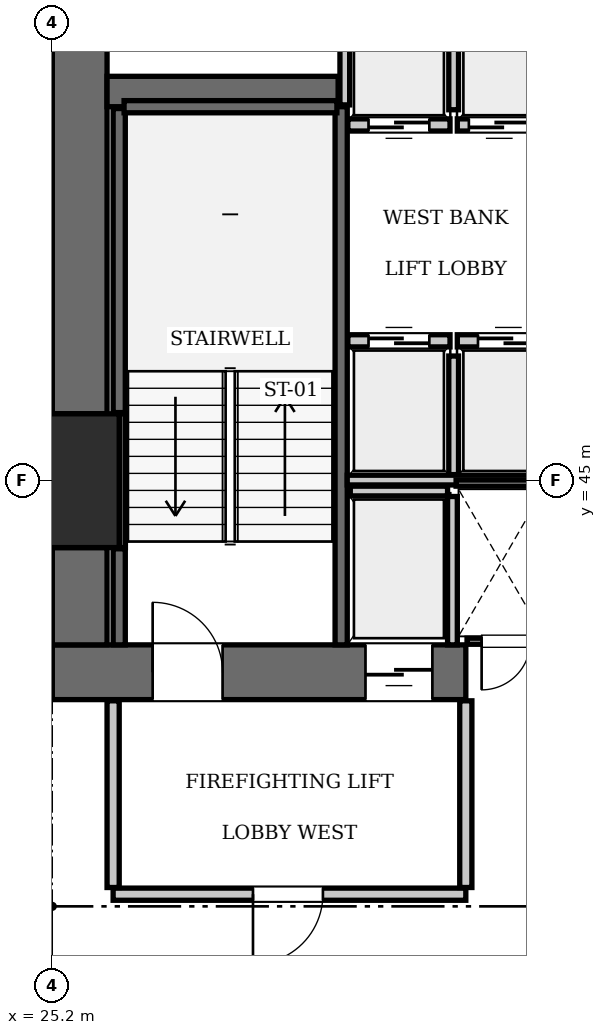
"""IFC4 building model, lengths in metres.
Left out: names, types, materials, properties, quantities, classifications, styles, units other than length and angle.
Written with IfcOpenShell. Run it as: python <this file> out.ifc"""

import sys

from ifc_helpers import new_model, si_unit, direction, frame, frame_2d, origin, origin_2d, place, context, subcontext, project, spatial, rectangle, extrude, element, fill, save


model = new_model("IFC4")
c1 = context("Model", 3, precision=1e-05, world=origin(), true_north=direction((0.0, 1.0)))
c2 = subcontext(c1, "Body", "Model", "MODEL_VIEW")
j1 = project(units=[si_unit("LENGTHUNIT", "METRE"), si_unit("PLANEANGLEUNIT", "RADIAN")], contexts=[c1])
p1 = place(None, origin())
s1 = spatial("IfcSite", under=j1, at=p1, CompositionType="ELEMENT")
p2 = place(p1, origin())
s2 = spatial("IfcBuilding", under=s1, at=p2, CompositionType="ELEMENT")
p3 = place(p2, frame((0.0, 0.0, 84.7)))
s3 = spatial("IfcBuildingStorey", under=s2, at=p3, CompositionType="ELEMENT", Elevation=84.7)
p4 = place(p3, frame((25.2, 45.0, 0.0), z_axis=(0.0, 0.0, 1.0), x_axis=(1.0, 0.0, 0.0)))
e1 = element("IfcColumn", 1, at=p4, inside=s3, PredefinedType="COLUMN", context=c2, shape_type="SweptSolid", body=[
    extrude(rectangle(XDim=2.2, YDim=2.2, at=origin_2d()), origin(), (0.0, 0.0, 1.0), 3.85),
])
p5 = place(p3, frame((25.2, 41.85, 0.0), z_axis=(0.0, 0.0, 1.0), x_axis=(1.0, 0.0, 0.0)))
e2 = element("IfcWall", 2, at=p5, inside=s3, PredefinedType="SHEAR", context=c2, shape_type="SweptSolid", body=[
    extrude(rectangle(XDim=6.8, YDim=0.9, at=frame_2d((3.4, 0.0))), origin(), (0.0, 0.0, 1.0), 3.85),
])
p6 = place(p5, frame((1.65, 0.0, 0.0)))
e3 = element("IfcOpeningElement", 3, at=p6, cuts=e2, PredefinedType="OPENING", context=c2, shape_type="SweptSolid", body=[
    extrude(rectangle(XDim=1.15, YDim=2.15, at=frame_2d((0.575, 1.075))), frame((0.0, 0.46, 0.0), z_axis=(0.0, -1.0, 0.0), x_axis=(1.0, 0.0, 0.0)), (0.0, 0.0, 1.0), 0.92),
])
p7 = place(p5, frame((5.15, 0.0, 0.0)))
e4 = element("IfcOpeningElement", 4, at=p7, cuts=e2, PredefinedType="OPENING", context=c2, shape_type="SweptSolid", body=[
    extrude(rectangle(XDim=1.1, YDim=2.2, at=frame_2d((0.55, 1.1))), frame((0.0, 0.46, 0.0), z_axis=(0.0, -1.0, 0.0), x_axis=(1.0, 0.0, 0.0)), (0.0, 0.0, 1.0), 0.92),
])
p8 = place(p3, frame((25.65, 42.3, 0.0), z_axis=(0.0, 0.0, 1.0), x_axis=(0.0, 1.0, 0.0)))
e5 = element("IfcWall", 5, at=p8, inside=s3, PredefinedType="SHEAR", context=c2, shape_type="SweptSolid", body=[
    extrude(rectangle(XDim=1.6, YDim=0.9, at=frame_2d((0.8, 0.0))), origin(), (0.0, 0.0, 1.0), 3.85),
])
p9 = place(p3, frame((25.65, 46.1, 0.0), z_axis=(0.0, 0.0, 1.0), x_axis=(0.0, 1.0, 0.0)))
e6 = element("IfcWall", 6, at=p9, inside=s3, PredefinedType="SHEAR", context=c2, shape_type="SweptSolid", body=[
    extrude(rectangle(XDim=7.0, YDim=0.9, at=frame_2d((3.5, 0.0))), origin(), (0.0, 0.0, 1.0), 3.85),
])
p10 = place(p3, frame((26.1, 51.4, 0.0), z_axis=(0.0, 0.0, 1.0), x_axis=(1.0, 0.0, 0.0)))
e7 = element("IfcWall", 7, at=p10, inside=s3, PredefinedType="SHEAR", context=c2, shape_type="SweptSolid", body=[
    extrude(rectangle(XDim=3.8, YDim=0.5, at=frame_2d((1.9, 0.0))), origin(), (0.0, 0.0, 1.0), 3.85),
])
p11 = place(p3, frame((29.95, 42.3, 0.0), z_axis=(0.0, 0.0, 1.0), x_axis=(0.0, 1.0, 0.0)))
e8 = element("IfcWall", 8, at=p11, inside=s3, PredefinedType="SOLIDWALL", context=c2, shape_type="SweptSolid", body=[
    extrude(rectangle(XDim=8.85, YDim=0.2, at=frame_2d((4.425, 0.0))), origin(), (0.0, 0.0, 1.0), 3.61),
])
p12 = place(p3, frame((26.3, 42.3, 0.0), z_axis=(0.0, 0.0, 1.0), x_axis=(0.0, 1.0, 0.0)))
e9 = element("IfcWall", 9, at=p12, inside=s3, PredefinedType="SOLIDWALL", context=c2, shape_type="SweptSolid", body=[
    extrude(rectangle(XDim=1.58, YDim=0.2, at=frame_2d((0.79, 0.0))), origin(), (0.0, 0.0, 1.0), 3.61),
])
p13 = place(p3, frame((26.3, 46.12, 0.0), z_axis=(0.0, 0.0, 1.0), x_axis=(0.0, 1.0, 0.0)))
e10 = element("IfcWall", 10, at=p13, inside=s3, PredefinedType="SOLIDWALL", context=c2, shape_type="SweptSolid", body=[
    extrude(rectangle(XDim=5.0, YDim=0.2, at=frame_2d((2.5, 0.0))), origin(), (0.0, 0.0, 1.0), 3.61),
])
p14 = place(p3, frame((26.38, 51.15, 0.0), z_axis=(0.0, 0.0, 1.0), x_axis=(1.0, 0.0, 0.0)))
e11 = element("IfcWall", 11, at=p14, inside=s3, PredefinedType="SOLIDWALL", context=c2, shape_type="SweptSolid", body=[
    extrude(rectangle(XDim=3.5, YDim=0.2, at=frame_2d((1.75, 0.0))), origin(), (0.0, 0.0, 1.0), 3.61),
])
p15 = place(p3, frame((26.352, 43.9, 0.0), z_axis=(0.0, 0.0, 1.0), x_axis=(0.0, 1.0, 0.0)))
e12 = element("IfcWall", 12, at=p15, inside=s3, PredefinedType="SOLIDWALL", context=c2, shape_type="SweptSolid", body=[
    extrude(rectangle(XDim=2.2, YDim=0.1, at=frame_2d((1.1, 0.0))), origin(), (0.0, 0.0, 1.0), 3.61),
])
p16 = place(p3, frame((30.06, 47.3, 0.0), z_axis=(0.0, 0.0, 1.0), x_axis=(1.0, 0.0, 0.0)))
e13 = element("IfcWall", 13, at=p16, inside=s3, PredefinedType="SOLIDWALL", context=c2, shape_type="SweptSolid", body=[
    extrude(rectangle(XDim=1.68, YDim=0.2, at=frame_2d((0.84, 0.0))), origin(), (0.0, 0.0, 1.0), 3.61),
])
p17 = place(p16, frame((0.34, 0.0, 0.0)))
e14 = element("IfcOpeningElement", 14, at=p17, cuts=e13, PredefinedType="OPENING", context=c2, shape_type="SweptSolid", body=[
    extrude(rectangle(XDim=1.0, YDim=2.15, at=frame_2d((0.5, 1.075))), frame((0.0, 0.11, 0.0), z_axis=(0.0, -1.0, 0.0), x_axis=(1.0, 0.0, 0.0)), (0.0, 0.0, 1.0), 0.22),
])
p18 = place(p3, frame((31.86, 47.3, 0.0), z_axis=(0.0, 0.0, 1.0), x_axis=(1.0, 0.0, 0.0)))
e15 = element("IfcWall", 15, at=p18, inside=s3, PredefinedType="SOLIDWALL", context=c2, shape_type="SweptSolid", body=[
    extrude(rectangle(XDim=1.68, YDim=0.2, at=frame_2d((0.84, 0.0))), origin(), (0.0, 0.0, 1.0), 3.61),
])
p19 = place(p18, frame((0.34, 0.0, 0.0)))
e16 = element("IfcOpeningElement", 16, at=p19, cuts=e15, PredefinedType="OPENING", context=c2, shape_type="SweptSolid", body=[
    extrude(rectangle(XDim=1.0, YDim=2.15, at=frame_2d((0.5, 1.075))), frame((0.0, 0.11, 0.0), z_axis=(0.0, -1.0, 0.0), x_axis=(1.0, 0.0, 0.0)), (0.0, 0.0, 1.0), 0.22),
])
p20 = place(p3, frame((30.06, 50.85, 0.0), z_axis=(0.0, 0.0, 1.0), x_axis=(1.0, 0.0, 0.0)))
e17 = element("IfcWall", 17, at=p20, inside=s3, PredefinedType="SOLIDWALL", context=c2, shape_type="SweptSolid", body=[
    extrude(rectangle(XDim=1.68, YDim=0.2, at=frame_2d((0.84, 0.0))), origin(), (0.0, 0.0, 1.0), 3.61),
])
p21 = place(p20, frame((0.34, 0.0, 0.0)))
e18 = element("IfcOpeningElement", 18, at=p21, cuts=e17, PredefinedType="OPENING", context=c2, shape_type="SweptSolid", body=[
    extrude(rectangle(XDim=1.0, YDim=2.15, at=frame_2d((0.5, 1.075))), frame((0.0, 0.11, 0.0), z_axis=(0.0, -1.0, 0.0), x_axis=(1.0, 0.0, 0.0)), (0.0, 0.0, 1.0), 0.22),
])
p22 = place(p3, frame((31.86, 50.85, 0.0), z_axis=(0.0, 0.0, 1.0), x_axis=(1.0, 0.0, 0.0)))
e19 = element("IfcWall", 19, at=p22, inside=s3, PredefinedType="SOLIDWALL", context=c2, shape_type="SweptSolid", body=[
    extrude(rectangle(XDim=1.38, YDim=0.2, at=frame_2d((0.69, 0.0))), origin(), (0.0, 0.0, 1.0), 3.61),
])
p23 = place(p22, frame((0.19, 0.0, 0.0)))
e20 = element("IfcOpeningElement", 20, at=p23, cuts=e19, PredefinedType="OPENING", context=c2, shape_type="SweptSolid", body=[
    extrude(rectangle(XDim=1.0, YDim=2.15, at=frame_2d((0.5, 1.075))), frame((0.0, 0.11, 0.0), z_axis=(0.0, -1.0, 0.0), x_axis=(1.0, 0.0, 0.0)), (0.0, 0.0, 1.0), 0.22),
])
p24 = place(p3, frame((30.1, 44.83, 0.0), z_axis=(0.0, 0.0, 1.0), x_axis=(1.0, 0.0, 0.0)))
e21 = element("IfcWall", 21, at=p24, inside=s3, PredefinedType="SOLIDWALL", context=c2, shape_type="SweptSolid", body=[
    extrude(rectangle(XDim=1.6, YDim=0.16, at=frame_2d((0.8, 0.0))), origin(), (0.0, 0.0, 1.0), 3.61),
])
p25 = place(p3, frame((31.78, 42.3, 0.0), z_axis=(0.0, 0.0, 1.0), x_axis=(0.0, 1.0, 0.0)))
e22 = element("IfcWall", 22, at=p25, inside=s3, PredefinedType="SOLIDWALL", context=c2, shape_type="SweptSolid", body=[
    extrude(rectangle(XDim=2.44, YDim=0.16, at=frame_2d((1.22, 0.0))), origin(), (0.0, 0.0, 1.0), 3.61),
])
p26 = place(p3, frame((31.8, 45.1, 0.0), z_axis=(0.0, 0.0, 1.0), x_axis=(0.0, 1.0, 0.0)))
e23 = element("IfcWall", 23, at=p26, inside=s3, PredefinedType="SOLIDWALL", context=c2, shape_type="SweptSolid", body=[
    extrude(rectangle(XDim=1.95, YDim=0.16, at=frame_2d((0.975, 0.0))), origin(), (0.0, 0.0, 1.0), 3.61),
])
p27 = place(p3, frame((30.05, 45.01, 0.0), z_axis=(0.0, 0.0, 1.0), x_axis=(1.0, 0.0, 0.0)))
e24 = element("IfcWall", 24, at=p27, inside=s3, PredefinedType="SOLIDWALL", context=c2, shape_type="SweptSolid", body=[
    extrude(rectangle(XDim=3.45, YDim=0.16, at=frame_2d((1.725, 0.0))), origin(), (0.0, 0.0, 1.0), 3.61),
])
p28 = place(p3, frame((30.01, 51.18, 0.0), z_axis=(0.0, 0.0, 1.0), x_axis=(0.0, 1.0, 0.0)))
e25 = element("IfcWall", 25, at=p28, inside=s3, PredefinedType="SOLIDWALL", context=c2, shape_type="SweptSolid", body=[
    extrude(rectangle(XDim=1.92, YDim=0.16, at=frame_2d((0.96, 0.0))), origin(), (0.0, 0.0, 1.0), 3.61),
])
p29 = place(p3, frame((31.8, 51.1, 0.0), z_axis=(0.0, 0.0, 1.0), x_axis=(0.0, 1.0, 0.0)))
e26 = element("IfcWall", 26, at=p29, inside=s3, PredefinedType="SOLIDWALL", context=c2, shape_type="SweptSolid", body=[
    extrude(rectangle(XDim=2.0, YDim=0.16, at=frame_2d((1.0, 0.0))), origin(), (0.0, 0.0, 1.0), 3.61),
])
p30 = place(p3, frame((26.2, 38.2, 0.0), z_axis=(0.0, 0.0, 1.0), x_axis=(1.0, 0.0, 0.0)))
e27 = element("IfcWall", 27, at=p30, inside=s3, PredefinedType="PARTITIONING", context=c2, shape_type="SweptSolid", body=[
    extrude(rectangle(XDim=5.8, YDim=0.2, at=frame_2d((2.9, 0.0))), origin(), (0.0, 0.0, 1.0), 3.61),
])
p31 = place(p30, frame((2.3, 0.0, 0.0)))
e28 = element("IfcOpeningElement", 28, at=p31, cuts=e27, PredefinedType="OPENING", context=c2, shape_type="SweptSolid", body=[
    extrude(rectangle(XDim=1.15, YDim=2.15, at=frame_2d((0.575, 1.075))), frame((0.0, 0.11, 0.0), z_axis=(0.0, -1.0, 0.0), x_axis=(1.0, 0.0, 0.0)), (0.0, 0.0, 1.0), 0.22),
])
for number, where, z_axis, x_axis in (
    (29, (26.2, 38.31, 0.0), (0.0, 0.0, 1.0), (0.0, 1.0, 0.0)),
    (30, (32.0, 38.31, 0.0), (0.0, 0.0, 1.0), (0.0, 1.0, 0.0)),
):
    element("IfcWall", number, at=place(p3, frame(where, z_axis=z_axis, x_axis=x_axis)), inside=s3, PredefinedType="PARTITIONING", context=c2, shape_type="SweptSolid", body=[
        extrude(rectangle(XDim=3.07, YDim=0.2, at=frame_2d((1.535, 0.0))), origin(), (0.0, 0.0, 1.0), 3.61),
    ])
p32 = place(p3, frame((32.02, 42.36, 0.0), z_axis=(0.0, 0.0, 1.0), x_axis=(1.0, 0.0, 0.0)))
e31 = element("IfcWall", 31, at=p32, inside=s3, PredefinedType="PARTITIONING", context=c2, shape_type="SweptSolid", body=[
    extrude(rectangle(XDim=1.32, YDim=0.1, at=frame_2d((0.66, 0.0))), origin(), (0.0, 0.0, 1.0), 3.61),
])
p33 = place(p32, frame((0.24, 0.0, 0.0)))
e32 = element("IfcOpeningElement", 32, at=p33, cuts=e31, PredefinedType="OPENING", context=c2, shape_type="SweptSolid", body=[
    extrude(rectangle(XDim=0.8, YDim=2.05, at=frame_2d((0.4, 1.025))), frame((0.0, 0.06, 0.0), z_axis=(0.0, -1.0, 0.0), x_axis=(1.0, 0.0, 0.0)), (0.0, 0.0, 1.0), 0.12),
])
p34 = place(p3, frame((31.84, 44.96, 0.0), z_axis=(0.0, 0.0, 1.0), x_axis=(1.0, 0.0, 0.0)))
e33 = element("IfcWall", 33, at=p34, inside=s3, PredefinedType="PARTITIONING", context=c2, shape_type="SweptSolid", body=[
    extrude(rectangle(XDim=1.48, YDim=0.1, at=frame_2d((0.74, 0.0))), origin(), (0.0, 0.0, 1.0), 3.61),
])
p35 = place(p6, origin())
e34 = element("IfcDoor", 34, at=p35, inside=s3, OperationType="SINGLE_SWING_LEFT", PredefinedType="DOOR", context=c2, shape_type="SweptSolid", body=[
    extrude(rectangle(XDim=1.15, YDim=2.15, at=frame_2d((0.575, 1.075))), frame((0.0, 0.025, 0.0), z_axis=(0.0, -1.0, 0.0), x_axis=(1.0, 0.0, 0.0)), (0.0, 0.0, 1.0), 0.05),
])
fill(e3, e34)
p36 = place(p17, origin())
e35 = element("IfcDoor", 35, at=p36, inside=s3, OperationType="SLIDING_TO_LEFT", PredefinedType="DOOR", context=c2, shape_type="SweptSolid", body=[
    extrude(rectangle(XDim=1.0, YDim=2.15, at=frame_2d((0.5, 1.075))), frame((0.0, 0.025, 0.0), z_axis=(0.0, -1.0, 0.0), x_axis=(1.0, 0.0, 0.0)), (0.0, 0.0, 1.0), 0.05),
])
fill(e14, e35)
p37 = place(p19, origin())
e36 = element("IfcDoor", 36, at=p37, inside=s3, OperationType="SLIDING_TO_LEFT", PredefinedType="DOOR", context=c2, shape_type="SweptSolid", body=[
    extrude(rectangle(XDim=1.0, YDim=2.15, at=frame_2d((0.5, 1.075))), frame((0.0, 0.025, 0.0), z_axis=(0.0, -1.0, 0.0), x_axis=(1.0, 0.0, 0.0)), (0.0, 0.0, 1.0), 0.05),
])
fill(e16, e36)
p38 = place(p21, frame((1.0, 0.0, 0.0), z_axis=(0.0, 0.0, 1.0), x_axis=(-1.0, 0.0, 0.0)))
e37 = element("IfcDoor", 37, at=p38, inside=s3, OperationType="SLIDING_TO_LEFT", PredefinedType="DOOR", context=c2, shape_type="SweptSolid", body=[
    extrude(rectangle(XDim=1.0, YDim=2.15, at=frame_2d((0.5, 1.075))), frame((0.0, 0.025, 0.0), z_axis=(0.0, -1.0, 0.0), x_axis=(1.0, 0.0, 0.0)), (0.0, 0.0, 1.0), 0.05),
])
fill(e18, e37)
p39 = place(p23, frame((1.0, 0.0, 0.0), z_axis=(0.0, 0.0, 1.0), x_axis=(-1.0, 0.0, 0.0)))
e38 = element("IfcDoor", 38, at=p39, inside=s3, OperationType="SLIDING_TO_LEFT", PredefinedType="DOOR", context=c2, shape_type="SweptSolid", body=[
    extrude(rectangle(XDim=1.0, YDim=2.15, at=frame_2d((0.5, 1.075))), frame((0.0, 0.025, 0.0), z_axis=(0.0, -1.0, 0.0), x_axis=(1.0, 0.0, 0.0)), (0.0, 0.0, 1.0), 0.05),
])
fill(e20, e38)
p40 = place(p7, frame((1.1, 0.0, 0.0), z_axis=(0.0, 0.0, 1.0), x_axis=(-1.0, 0.0, 0.0)))
e39 = element("IfcDoor", 39, at=p40, inside=s3, OperationType="SLIDING_TO_LEFT", PredefinedType="DOOR", context=c2, shape_type="SweptSolid", body=[
    extrude(rectangle(XDim=1.1, YDim=2.2, at=frame_2d((0.55, 1.1))), frame((0.0, 0.025, 0.0), z_axis=(0.0, -1.0, 0.0), x_axis=(1.0, 0.0, 0.0)), (0.0, 0.0, 1.0), 0.05),
])
fill(e4, e39)
p41 = place(p31, frame((1.15, 0.0, 0.0), z_axis=(0.0, 0.0, 1.0), x_axis=(-1.0, 0.0, 0.0)))
e40 = element("IfcDoor", 40, at=p41, inside=s3, OperationType="SINGLE_SWING_RIGHT", PredefinedType="DOOR", context=c2, shape_type="SweptSolid", body=[
    extrude(rectangle(XDim=1.15, YDim=2.15, at=frame_2d((0.575, 1.075))), frame((0.0, 0.025, 0.0), z_axis=(0.0, -1.0, 0.0), x_axis=(1.0, 0.0, 0.0)), (0.0, 0.0, 1.0), 0.05),
])
fill(e28, e40)
p42 = place(p33, frame((0.8, 0.0, 0.0), z_axis=(0.0, 0.0, 1.0), x_axis=(-1.0, 0.0, 0.0)))
e41 = element("IfcDoor", 41, at=p42, inside=s3, OperationType="SINGLE_SWING_RIGHT", PredefinedType="DOOR", context=c2, shape_type="SweptSolid", body=[
    extrude(rectangle(XDim=0.8, YDim=2.05, at=frame_2d((0.4, 1.025))), frame((0.0, 0.025, 0.0), z_axis=(0.0, -1.0, 0.0), x_axis=(1.0, 0.0, 0.0)), (0.0, 0.0, 1.0), 0.05),
])
fill(e32, e41)
save(model, sys.argv[1])
